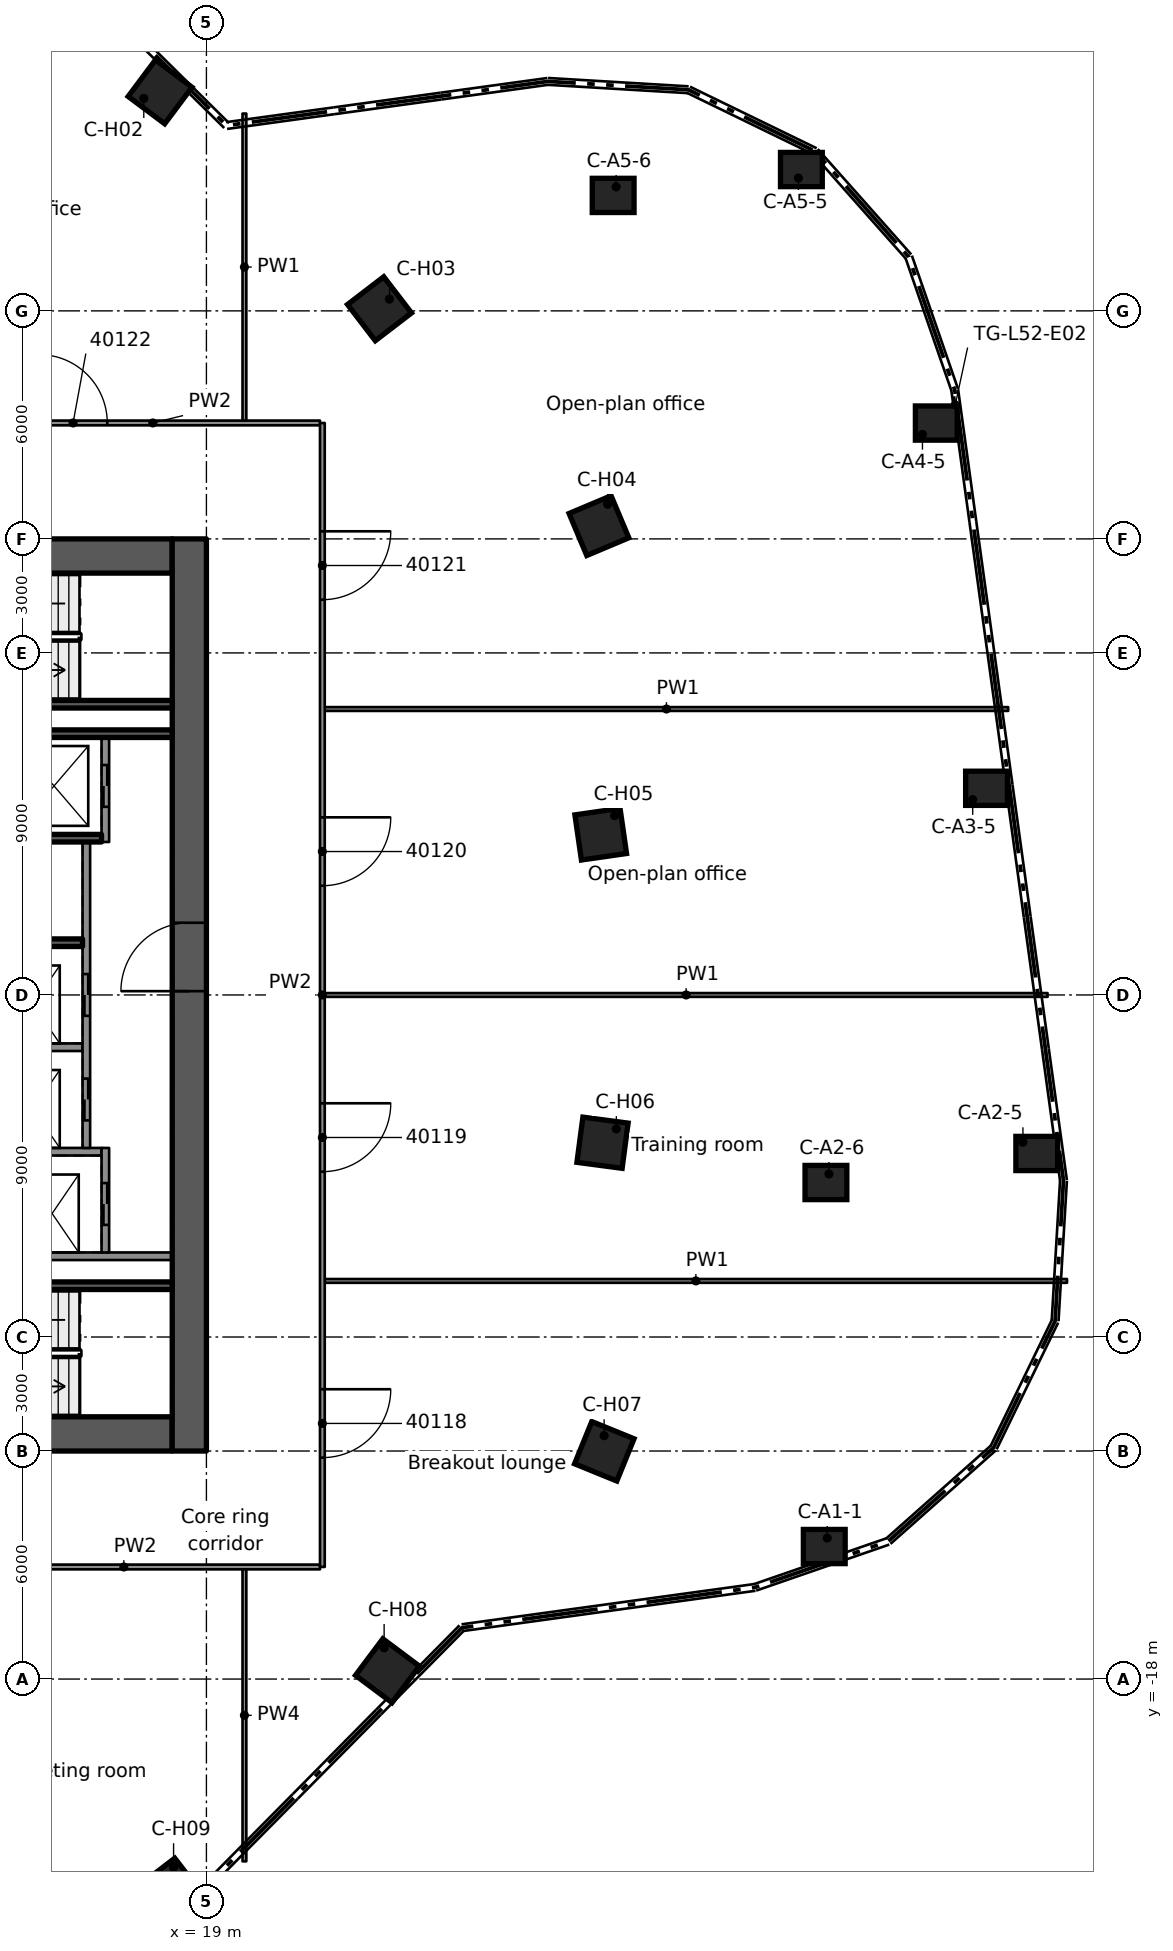
"""IFC4 building model, lengths in metres.
Left out: names, types, materials, properties, quantities, classifications, styles, units other than length and angle.
Written with IfcOpenShell. Run it as: python <this file> out.ifc"""

import sys

from ifc_helpers import new_model, si_unit, direction, frame, frame_2d, origin, origin_2d, place, context, subcontext, project, spatial, rectangle, extrude, element, fill, save


model = new_model("IFC4")
c1 = context("Model", 3, precision=1e-05, world=origin(), true_north=direction((0.0, 1.0)))
c2 = subcontext(c1, "Body", "Model", "MODEL_VIEW")
j1 = project(units=[si_unit("LENGTHUNIT", "METRE"), si_unit("PLANEANGLEUNIT", "RADIAN")], contexts=[c1])
p1 = place(None, origin())
s1 = spatial("IfcSite", under=j1, at=p1, CompositionType="ELEMENT")
p2 = place(p1, origin())
s2 = spatial("IfcBuilding", under=s1, at=p2, CompositionType="ELEMENT")
p3 = place(p2, frame((0.0, 0.0, 199.1)))
s3 = spatial("IfcBuildingStorey", under=s2, at=p3, CompositionType="ELEMENT", Elevation=199.1)
p4 = place(p3, frame((8.9, 11.55, 0.0), z_axis=(0.0, 0.0, 1.0), x_axis=(1.0, 0.0, 0.0)))
e1 = element("IfcWall", 1, at=p4, inside=s3, PredefinedType="SHEAR", context=c2, shape_type="SweptSolid", body=[
    extrude(rectangle(XDim=9.2, YDim=0.9, at=frame_2d((4.6, 0.0))), origin(), (0.0, 0.0, 1.0), 3.5),
])
p5 = place(p4, frame((3.0, 0.0, 0.0)))
e2 = element("IfcOpeningElement", 2, at=p5, cuts=e1, PredefinedType="OPENING", context=c2, shape_type="SweptSolid", body=[
    extrude(rectangle(XDim=1.1, YDim=2.1, at=frame_2d((0.55, 1.05))), frame((0.0, 0.46, 0.0), z_axis=(0.0, -1.0, 0.0), x_axis=(1.0, 0.0, 0.0)), (0.0, 0.0, 1.0), 0.92),
])
p6 = place(p3, frame((8.9, -11.55, 0.0), z_axis=(0.0, 0.0, 1.0), x_axis=(1.0, 0.0, 0.0)))
e3 = element("IfcWall", 3, at=p6, inside=s3, PredefinedType="SHEAR", context=c2, shape_type="SweptSolid", body=[
    extrude(rectangle(XDim=9.2, YDim=0.9, at=frame_2d((4.6, 0.0))), origin(), (0.0, 0.0, 1.0), 3.5),
])
p7 = place(p6, frame((3.0, 0.0, 0.0)))
e4 = element("IfcOpeningElement", 4, at=p7, cuts=e3, PredefinedType="OPENING", context=c2, shape_type="SweptSolid", body=[
    extrude(rectangle(XDim=1.1, YDim=2.1, at=frame_2d((0.55, 1.05))), frame((0.0, 0.46, 0.0), z_axis=(0.0, -1.0, 0.0), x_axis=(1.0, 0.0, 0.0)), (0.0, 0.0, 1.0), 0.92),
])
p8 = place(p3, frame((18.55, -12.0, 0.0), z_axis=(0.0, 0.0, 1.0), x_axis=(0.0, 1.0, 0.0)))
e5 = element("IfcWall", 5, at=p8, inside=s3, PredefinedType="SHEAR", context=c2, shape_type="SweptSolid", body=[
    extrude(rectangle(XDim=24.0, YDim=0.9, at=frame_2d((12.0, 0.0))), origin(), (0.0, 0.0, 1.0), 3.5),
])
p9 = place(p8, frame((12.1, 0.0, 0.0)))
e6 = element("IfcOpeningElement", 6, at=p9, cuts=e5, PredefinedType="OPENING", context=c2, shape_type="SweptSolid", body=[
    extrude(rectangle(XDim=1.8, YDim=2.1, at=frame_2d((0.9, 1.05))), frame((0.0, 0.46, 0.0), z_axis=(0.0, -1.0, 0.0), x_axis=(1.0, 0.0, 0.0)), (0.0, 0.0, 1.0), 0.92),
])
for number, where, z_axis, x_axis in (
    (7, (35.258, -14.513, 0.0), (0.0, 0.0, 1.0), (1.0, 0.0, 0.0)),
    (8, (40.85, -4.171, 0.0), (0.0, 0.0, 1.0), (1.0, 0.0, 0.0)),
    (9, (35.302, -4.935, 0.0), (0.0, 0.0, 1.0), (1.0, 0.0, 0.0)),
    (10, (39.528, 5.438, 0.0), (0.0, 0.0, 1.0), (1.0, 0.0, 0.0)),
    (11, (38.206, 15.048, 0.0), (0.0, 0.0, 1.0), (1.0, 0.0, 0.0)),
    (12, (34.656, 21.719, 0.0), (0.0, 0.0, 1.0), (1.0, 0.0, 0.0)),
    (13, (29.703, 21.038, 0.0), (0.0, 0.0, 1.0), (1.0, 0.0, 0.0)),
):
    element("IfcColumn", number, at=place(p3, frame(where, z_axis=z_axis, x_axis=x_axis)), inside=s3, PredefinedType="COLUMN", context=c2, shape_type="SweptSolid", body=[
        extrude(rectangle(XDim=1.1, YDim=0.9, at=origin_2d()), origin(), (0.0, 0.0, 1.0), 3.5),
    ])
for number, where, z_axis, x_axis in (
    (14, (17.781, 23.763, 0.0), (0.0, 0.0, 1.0), (0.599, 0.801, 0.0)),
    (15, (23.555, 18.056, 0.0), (0.0, 0.0, 1.0), (0.794, 0.608, 0.0)),
    (16, (29.329, 12.349, 0.0), (0.0, 0.0, 1.0), (0.922, 0.388, 0.0)),
    (17, (29.376, 4.23, 0.0), (0.0, 0.0, 1.0), (0.99, 0.143, 0.0)),
    (18, (29.423, -3.888, 0.0), (0.0, 0.0, 1.0), (0.991, -0.131, 0.0)),
    (19, (29.47, -12.007, 0.0), (0.0, 0.0, 1.0), (0.926, -0.377, 0.0)),
    (20, (23.763, -17.781, 0.0), (0.0, 0.0, 1.0), (0.801, -0.599, 0.0)),
    (21, (18.056, -23.555, 0.0), (0.0, 0.0, 1.0), (0.608, -0.794, 0.0)),
):
    element("IfcColumn", number, at=place(p3, frame(where, z_axis=z_axis, x_axis=x_axis)), inside=s3, PredefinedType="COLUMN", context=c2, shape_type="SweptSolid", body=[
        extrude(rectangle(XDim=1.2, YDim=1.2, at=origin_2d()), origin(), (0.0, 0.0, 1.0), 3.5),
    ])
for number, where, z_axis, x_axis in (
    (22, (11.54, -6.875, 0.0), (0.0, 0.0, 1.0), (1.0, 0.0, 0.0)),
    (23, (11.54, 6.875, 0.0), (0.0, 0.0, 1.0), (1.0, 0.0, 0.0)),
):
    element("IfcWall", number, at=place(p3, frame(where, z_axis=z_axis, x_axis=x_axis)), inside=s3, PredefinedType="SOLIDWALL", context=c2, shape_type="SweptSolid", body=[
        extrude(rectangle(XDim=6.56, YDim=0.2, at=frame_2d((3.28, 0.0))), origin(), (0.0, 0.0, 1.0), 3.08),
    ])
p10 = place(p3, frame((11.54, 4.125, 0.0), z_axis=(0.0, 0.0, 1.0), x_axis=(1.0, 0.0, 0.0)))
e24 = element("IfcWall", 24, at=p10, inside=s3, PredefinedType="SOLIDWALL", context=c2, shape_type="SweptSolid", body=[
    extrude(rectangle(XDim=4.7, YDim=0.2, at=frame_2d((2.35, 0.0))), origin(), (0.0, 0.0, 1.0), 3.08),
])
p11 = place(p3, frame((13.74, 1.375, 0.0), z_axis=(0.0, 0.0, 1.0), x_axis=(1.0, 0.0, 0.0)))
e25 = element("IfcWall", 25, at=p11, inside=s3, PredefinedType="SOLIDWALL", context=c2, shape_type="SweptSolid", body=[
    extrude(rectangle(XDim=2.0, YDim=0.2, at=frame_2d((1.0, 0.0))), origin(), (0.0, 0.0, 1.0), 3.08),
])
p12 = place(p3, frame((11.54, -1.375, 0.0), z_axis=(0.0, 0.0, 1.0), x_axis=(1.0, 0.0, 0.0)))
e26 = element("IfcWall", 26, at=p12, inside=s3, PredefinedType="SOLIDWALL", context=c2, shape_type="SweptSolid", body=[
    extrude(rectangle(XDim=4.2, YDim=0.2, at=frame_2d((2.1, 0.0))), origin(), (0.0, 0.0, 1.0), 3.08),
])
p13 = place(p3, frame((11.54, -4.125, 0.0), z_axis=(0.0, 0.0, 1.0), x_axis=(1.0, 0.0, 0.0)))
e27 = element("IfcWall", 27, at=p13, inside=s3, PredefinedType="SOLIDWALL", context=c2, shape_type="SweptSolid", body=[
    extrude(rectangle(XDim=4.7, YDim=0.2, at=frame_2d((2.35, 0.0))), origin(), (0.0, 0.0, 1.0), 3.08),
])
p14 = place(p3, frame((16.34, 6.775, 0.0), z_axis=(0.0, 0.0, 1.0), x_axis=(0.0, -1.0, 0.0)))
e28 = element("IfcWall", 28, at=p14, inside=s3, PredefinedType="SOLIDWALL", context=c2, shape_type="SweptSolid", body=[
    extrude(rectangle(XDim=2.75, YDim=0.2, at=frame_2d((1.375, 0.0))), origin(), (0.0, 0.0, 1.0), 3.08),
])
p15 = place(p14, frame((0.725, 0.0, 0.0)))
e29 = element("IfcOpeningElement", 29, at=p15, cuts=e28, PredefinedType="OPENING", context=c2, shape_type="SweptSolid", body=[
    extrude(rectangle(XDim=1.1, YDim=2.1, at=frame_2d((0.55, 1.05))), frame((0.0, 0.11, 0.0), z_axis=(0.0, -1.0, 0.0), x_axis=(1.0, 0.0, 0.0)), (0.0, 0.0, 1.0), 0.22),
])
p16 = place(p3, frame((15.84, 4.025, 0.0), z_axis=(0.0, 0.0, 1.0), x_axis=(0.0, -1.0, 0.0)))
e30 = element("IfcWall", 30, at=p16, inside=s3, PredefinedType="SOLIDWALL", context=c2, shape_type="SweptSolid", body=[
    extrude(rectangle(XDim=8.05, YDim=0.2, at=frame_2d((4.025, 0.0))), origin(), (0.0, 0.0, 1.0), 3.08),
])
p17 = place(p16, frame((3.475, 0.0, 0.0)))
e31 = element("IfcOpeningElement", 31, at=p17, cuts=e30, PredefinedType="OPENING", context=c2, shape_type="SweptSolid", body=[
    extrude(rectangle(XDim=1.1, YDim=2.1, at=frame_2d((0.55, 1.05))), frame((0.0, 0.11, 0.0), z_axis=(0.0, -1.0, 0.0), x_axis=(1.0, 0.0, 0.0)), (0.0, 0.0, 1.0), 0.22),
])
p18 = place(p16, frame((6.225, 0.0, 0.0)))
e32 = element("IfcOpeningElement", 32, at=p18, cuts=e30, PredefinedType="OPENING", context=c2, shape_type="SweptSolid", body=[
    extrude(rectangle(XDim=1.1, YDim=2.1, at=frame_2d((0.55, 1.05))), frame((0.0, 0.11, 0.0), z_axis=(0.0, -1.0, 0.0), x_axis=(1.0, 0.0, 0.0)), (0.0, 0.0, 1.0), 0.22),
])
p19 = place(p3, frame((16.34, -4.025, 0.0), z_axis=(0.0, 0.0, 1.0), x_axis=(0.0, -1.0, 0.0)))
e33 = element("IfcWall", 33, at=p19, inside=s3, PredefinedType="SOLIDWALL", context=c2, shape_type="SweptSolid", body=[
    extrude(rectangle(XDim=2.75, YDim=0.2, at=frame_2d((1.375, 0.0))), origin(), (0.0, 0.0, 1.0), 3.08),
])
p20 = place(p19, frame((0.925, 0.0, 0.0)))
e34 = element("IfcOpeningElement", 34, at=p20, cuts=e33, PredefinedType="OPENING", context=c2, shape_type="SweptSolid", body=[
    extrude(rectangle(XDim=1.1, YDim=2.1, at=frame_2d((0.55, 1.05))), frame((0.0, 0.11, 0.0), z_axis=(0.0, -1.0, 0.0), x_axis=(1.0, 0.0, 0.0)), (0.0, 0.0, 1.0), 0.22),
])
for number, where, z_axis, x_axis in (
    (35, (11.54, -7.65, 0.0), (0.0, 0.0, 1.0), (1.0, 0.0, 0.0)),
    (36, (11.54, 7.65, 0.0), (0.0, 0.0, 1.0), (1.0, 0.0, 0.0)),
):
    element("IfcWall", number, at=place(p3, frame(where, z_axis=z_axis, x_axis=x_axis)), inside=s3, PredefinedType="SOLIDWALL", context=c2, shape_type="SweptSolid", body=[
        extrude(rectangle(XDim=6.56, YDim=0.2, at=frame_2d((3.28, 0.0))), origin(), (0.0, 0.0, 1.0), 3.08),
    ])
p21 = place(p3, frame((11.665, -15.051, 0.0), z_axis=(0.0, 0.0, 1.0), x_axis=(1.0, 0.0, 0.0)))
e37 = element("IfcWall", 37, at=p21, inside=s3, PredefinedType="PARTITIONING", context=c2, shape_type="SweptSolid", body=[
    extrude(rectangle(XDim=10.323, YDim=0.125, at=frame_2d((5.162, 0.0))), origin(), (0.0, 0.0, 1.0), 3.03),
])
p22 = place(p3, frame((22.113, -7.524, 0.0), z_axis=(0.0, 0.0, 1.0), x_axis=(1.0, 0.0, 0.0)))
e38 = element("IfcWall", 38, at=p22, inside=s3, PredefinedType="PARTITIONING", context=c2, shape_type="SweptSolid", body=[
    extrude(rectangle(XDim=19.533, YDim=0.1, at=frame_2d((9.767, 0.0))), origin(), (0.0, 0.0, 1.0), 3.03),
])
p23 = place(p3, frame((22.113, 0.0, 0.0), z_axis=(0.0, 0.0, 1.0), x_axis=(1.0, 0.0, 0.0)))
e39 = element("IfcWall", 39, at=p23, inside=s3, PredefinedType="PARTITIONING", context=c2, shape_type="SweptSolid", body=[
    extrude(rectangle(XDim=19.021, YDim=0.1, at=frame_2d((9.51, 0.0))), origin(), (0.0, 0.0, 1.0), 3.03),
])
p24 = place(p3, frame((22.113, 7.524, 0.0), z_axis=(0.0, 0.0, 1.0), x_axis=(1.0, 0.0, 0.0)))
e40 = element("IfcWall", 40, at=p24, inside=s3, PredefinedType="PARTITIONING", context=c2, shape_type="SweptSolid", body=[
    extrude(rectangle(XDim=17.985, YDim=0.1, at=frame_2d((8.992, 0.0))), origin(), (0.0, 0.0, 1.0), 3.03),
])
p25 = place(p3, frame((10.991, 15.051, 0.0), z_axis=(0.0, 0.0, 1.0), x_axis=(1.0, 0.0, 0.0)))
e41 = element("IfcWall", 41, at=p25, inside=s3, PredefinedType="PARTITIONING", context=c2, shape_type="SweptSolid", body=[
    extrude(rectangle(XDim=10.997, YDim=0.125, at=frame_2d((5.499, 0.0))), origin(), (0.0, 0.0, 1.0), 3.03),
])
p26 = place(p25, frame((3.6, 0.0, 0.0)))
e42 = element("IfcOpeningElement", 42, at=p26, cuts=e41, PredefinedType="OPENING", context=c2, shape_type="SweptSolid", body=[
    extrude(rectangle(XDim=1.8, YDim=2.1, at=frame_2d((0.9, 1.05))), frame((0.0, 0.073, 0.0), z_axis=(0.0, -1.0, 0.0), x_axis=(1.0, 0.0, 0.0)), (0.0, 0.0, 1.0), 0.145),
])
p27 = place(p3, frame((22.051, 15.05, 0.0), z_axis=(0.0, 0.0, 1.0), x_axis=(0.0, -1.0, 0.0)))
e43 = element("IfcWall", 43, at=p27, inside=s3, PredefinedType="PARTITIONING", context=c2, shape_type="SweptSolid", body=[
    extrude(rectangle(XDim=30.1, YDim=0.125, at=frame_2d((15.05, 0.0))), origin(), (0.0, 0.0, 1.0), 3.03),
])
p28 = place(p27, frame((25.424, 0.0, 0.0)))
e44 = element("IfcOpeningElement", 44, at=p28, cuts=e43, PredefinedType="OPENING", context=c2, shape_type="SweptSolid", body=[
    extrude(rectangle(XDim=1.8, YDim=2.1, at=frame_2d((0.9, 1.05))), frame((0.0, 0.073, 0.0), z_axis=(0.0, -1.0, 0.0), x_axis=(1.0, 0.0, 0.0)), (0.0, 0.0, 1.0), 0.145),
])
p29 = place(p27, frame((17.9, 0.0, 0.0)))
e45 = element("IfcOpeningElement", 45, at=p29, cuts=e43, PredefinedType="OPENING", context=c2, shape_type="SweptSolid", body=[
    extrude(rectangle(XDim=1.8, YDim=2.1, at=frame_2d((0.9, 1.05))), frame((0.0, 0.073, 0.0), z_axis=(0.0, -1.0, 0.0), x_axis=(1.0, 0.0, 0.0)), (0.0, 0.0, 1.0), 0.145),
])
p30 = place(p27, frame((10.376, 0.0, 0.0)))
e46 = element("IfcOpeningElement", 46, at=p30, cuts=e43, PredefinedType="OPENING", context=c2, shape_type="SweptSolid", body=[
    extrude(rectangle(XDim=1.8, YDim=2.1, at=frame_2d((0.9, 1.05))), frame((0.0, 0.073, 0.0), z_axis=(0.0, -1.0, 0.0), x_axis=(1.0, 0.0, 0.0)), (0.0, 0.0, 1.0), 0.145),
])
p31 = place(p27, frame((2.85, 0.0, 0.0)))
e47 = element("IfcOpeningElement", 47, at=p31, cuts=e43, PredefinedType="OPENING", context=c2, shape_type="SweptSolid", body=[
    extrude(rectangle(XDim=1.8, YDim=2.1, at=frame_2d((0.9, 1.05))), frame((0.0, 0.073, 0.0), z_axis=(0.0, -1.0, 0.0), x_axis=(1.0, 0.0, 0.0)), (0.0, 0.0, 1.0), 0.145),
])
p32 = place(p3, frame((20.0, -22.796, 0.0), z_axis=(0.0, 0.0, 1.0), x_axis=(0.0, 1.0, 0.0)))
e48 = element("IfcWall", 48, at=p32, inside=s3, PredefinedType="PARTITIONING", context=c2, shape_type="SweptSolid", body=[
    extrude(rectangle(XDim=7.682, YDim=0.1, at=frame_2d((3.841, 0.0))), origin(), (0.0, 0.0, 1.0), 2.395),
])
p33 = place(p3, frame((20.0, 15.114, 0.0), z_axis=(0.0, 0.0, 1.0), x_axis=(0.0, 1.0, 0.0)))
e49 = element("IfcWall", 49, at=p33, inside=s3, PredefinedType="PARTITIONING", context=c2, shape_type="SweptSolid", body=[
    extrude(rectangle(XDim=8.078, YDim=0.1, at=frame_2d((4.039, 0.0))), origin(), (0.0, 0.0, 1.0), 3.03),
])
p34 = place(p15, origin())
e50 = element("IfcDoor", 50, at=p34, inside=s3, OperationType="DOUBLE_DOOR_SLIDING", PredefinedType="DOOR", context=c2, shape_type="SweptSolid", body=[
    extrude(rectangle(XDim=1.1, YDim=2.1, at=frame_2d((0.55, 1.05))), frame((0.0, 0.025, 0.0), z_axis=(0.0, -1.0, 0.0), x_axis=(1.0, 0.0, 0.0)), (0.0, 0.0, 1.0), 0.05),
])
fill(e29, e50)
p35 = place(p17, origin())
e51 = element("IfcDoor", 51, at=p35, inside=s3, OperationType="DOUBLE_DOOR_SLIDING", PredefinedType="DOOR", context=c2, shape_type="SweptSolid", body=[
    extrude(rectangle(XDim=1.1, YDim=2.1, at=frame_2d((0.55, 1.05))), frame((0.0, 0.025, 0.0), z_axis=(0.0, -1.0, 0.0), x_axis=(1.0, 0.0, 0.0)), (0.0, 0.0, 1.0), 0.05),
])
fill(e31, e51)
p36 = place(p18, origin())
e52 = element("IfcDoor", 52, at=p36, inside=s3, OperationType="DOUBLE_DOOR_SLIDING", PredefinedType="DOOR", context=c2, shape_type="SweptSolid", body=[
    extrude(rectangle(XDim=1.1, YDim=2.1, at=frame_2d((0.55, 1.05))), frame((0.0, 0.025, 0.0), z_axis=(0.0, -1.0, 0.0), x_axis=(1.0, 0.0, 0.0)), (0.0, 0.0, 1.0), 0.05),
])
fill(e32, e52)
p37 = place(p20, origin())
e53 = element("IfcDoor", 53, at=p37, inside=s3, OperationType="DOUBLE_DOOR_SLIDING", PredefinedType="DOOR", context=c2, shape_type="SweptSolid", body=[
    extrude(rectangle(XDim=1.1, YDim=2.1, at=frame_2d((0.55, 1.05))), frame((0.0, 0.025, 0.0), z_axis=(0.0, -1.0, 0.0), x_axis=(1.0, 0.0, 0.0)), (0.0, 0.0, 1.0), 0.05),
])
fill(e34, e53)
p38 = place(p9, origin())
e54 = element("IfcDoor", 54, at=p38, inside=s3, OperationType="SINGLE_SWING_RIGHT", PredefinedType="DOOR", context=c2, shape_type="SweptSolid", body=[
    extrude(rectangle(XDim=1.8, YDim=2.1, at=frame_2d((0.9, 1.05))), frame((0.0, 0.025, 0.0), z_axis=(0.0, -1.0, 0.0), x_axis=(1.0, 0.0, 0.0)), (0.0, 0.0, 1.0), 0.05),
])
fill(e6, e54)
p39 = place(p28, origin())
e55 = element("IfcDoor", 55, at=p39, inside=s3, OperationType="DOUBLE_DOOR_SINGLE_SWING", PredefinedType="DOOR", context=c2, shape_type="SweptSolid", body=[
    extrude(rectangle(XDim=1.8, YDim=2.1, at=frame_2d((0.9, 1.05))), frame((0.0, 0.025, 0.0), z_axis=(0.0, -1.0, 0.0), x_axis=(1.0, 0.0, 0.0)), (0.0, 0.0, 1.0), 0.05),
])
fill(e44, e55)
p40 = place(p29, origin())
e56 = element("IfcDoor", 56, at=p40, inside=s3, OperationType="DOUBLE_DOOR_SINGLE_SWING", PredefinedType="DOOR", context=c2, shape_type="SweptSolid", body=[
    extrude(rectangle(XDim=1.8, YDim=2.1, at=frame_2d((0.9, 1.05))), frame((0.0, 0.025, 0.0), z_axis=(0.0, -1.0, 0.0), x_axis=(1.0, 0.0, 0.0)), (0.0, 0.0, 1.0), 0.05),
])
fill(e45, e56)
p41 = place(p30, origin())
e57 = element("IfcDoor", 57, at=p41, inside=s3, OperationType="DOUBLE_DOOR_SINGLE_SWING", PredefinedType="DOOR", context=c2, shape_type="SweptSolid", body=[
    extrude(rectangle(XDim=1.8, YDim=2.1, at=frame_2d((0.9, 1.05))), frame((0.0, 0.025, 0.0), z_axis=(0.0, -1.0, 0.0), x_axis=(1.0, 0.0, 0.0)), (0.0, 0.0, 1.0), 0.05),
])
fill(e46, e57)
p42 = place(p31, origin())
e58 = element("IfcDoor", 58, at=p42, inside=s3, OperationType="DOUBLE_DOOR_SINGLE_SWING", PredefinedType="DOOR", context=c2, shape_type="SweptSolid", body=[
    extrude(rectangle(XDim=1.8, YDim=2.1, at=frame_2d((0.9, 1.05))), frame((0.0, 0.025, 0.0), z_axis=(0.0, -1.0, 0.0), x_axis=(1.0, 0.0, 0.0)), (0.0, 0.0, 1.0), 0.05),
])
fill(e47, e58)
p43 = place(p26, origin())
e59 = element("IfcDoor", 59, at=p43, inside=s3, OperationType="DOUBLE_DOOR_SINGLE_SWING", PredefinedType="DOOR", context=c2, shape_type="SweptSolid", body=[
    extrude(rectangle(XDim=1.8, YDim=2.1, at=frame_2d((0.9, 1.05))), frame((0.0, 0.025, 0.0), z_axis=(0.0, -1.0, 0.0), x_axis=(1.0, 0.0, 0.0)), (0.0, 0.0, 1.0), 0.05),
])
fill(e42, e59)
save(model, sys.argv[1])
